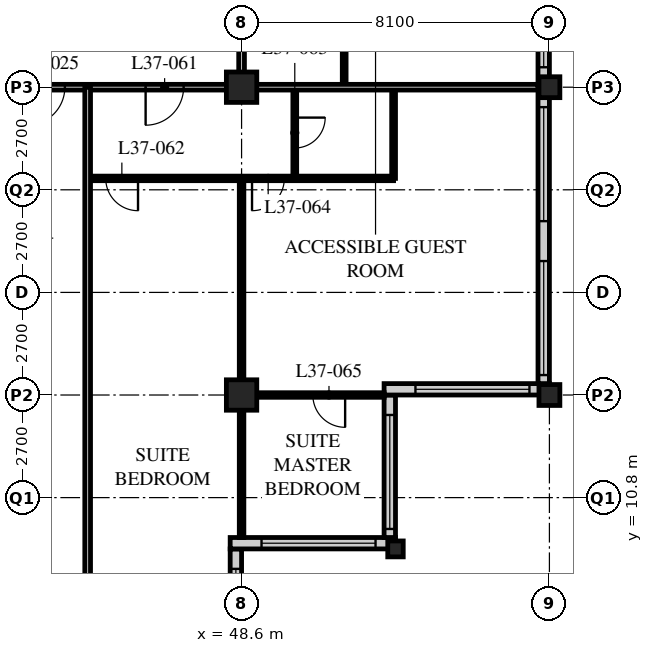
"""IFC4 building model, lengths in metres.
Left out: names, types, materials, properties, quantities, classifications, styles, units other than length and angle.
Written with IfcOpenShell. Run it as: python <this file> out.ifc"""

import sys

from ifc_helpers import new_model, si_unit, direction, frame, frame_2d, origin, origin_2d, place, context, subcontext, project, spatial, rectangle, hollow_rectangle, i_section, extrude, element, fill, save


model = new_model("IFC4")
c1 = context("Model", 3, precision=1e-05, world=origin(), true_north=direction((0.0, 1.0)))
c2 = subcontext(c1, "Body", "Model", "MODEL_VIEW")
j1 = project(units=[si_unit("LENGTHUNIT", "METRE"), si_unit("PLANEANGLEUNIT", "RADIAN")], contexts=[c1])
p1 = place(None, origin())
s1 = spatial("IfcSite", under=j1, at=p1, CompositionType="ELEMENT")
p2 = place(p1, origin())
s2 = spatial("IfcBuilding", under=s1, at=p2, CompositionType="ELEMENT")
p3 = place(p2, frame((0.0, 0.0, 144.2)))
s3 = spatial("IfcBuildingStorey", under=s2, at=p3, CompositionType="ELEMENT", Elevation=144.2)
for number, where, z_axis, x_axis in (
    (1, (48.6, 13.5, 0.0), (0.0, 0.0, 1.0), (1.0, 0.0, 0.0)),
    (2, (48.6, 21.6, 0.0), (0.0, 0.0, 1.0), (1.0, 0.0, 0.0)),
):
    element("IfcColumn", number, at=place(p3, frame(where, z_axis=z_axis, x_axis=x_axis)), inside=s3, PredefinedType="COLUMN", context=c2, shape_type="SweptSolid", body=[
        extrude(hollow_rectangle(XDim=0.8, YDim=0.8, WallThickness=0.08, at=origin_2d()), origin(), (0.0, 0.0, 1.0), 3.4),
    ])
p4 = place(p3, frame((52.65, 9.45, 0.0), z_axis=(0.0, 0.0, 1.0), x_axis=(1.0, 0.0, 0.0)))
e3 = element("IfcColumn", 3, at=p4, inside=s3, PredefinedType="COLUMN", context=c2, shape_type="SweptSolid", body=[
    extrude(i_section(OverallWidth=0.407, OverallDepth=0.419, WebThickness=0.031, FlangeThickness=0.049, FilletRadius=0.015, at=origin_2d()), origin(), (0.0, 0.0, 1.0), 3.4),
])
for number, where, z_axis, x_axis in (
    (4, (56.7, 13.5, 0.0), (0.0, 0.0, 1.0), (1.0, 0.0, 0.0)),
    (5, (56.7, 21.6, 0.0), (0.0, 0.0, 1.0), (1.0, 0.0, 0.0)),
):
    element("IfcColumn", number, at=place(p3, frame(where, z_axis=z_axis, x_axis=x_axis)), inside=s3, PredefinedType="COLUMN", context=c2, shape_type="SweptSolid", body=[
        extrude(hollow_rectangle(XDim=0.55, YDim=0.55, WallThickness=0.04, at=origin_2d()), origin(), (0.0, 0.0, 1.0), 3.4),
    ])
p5 = place(p3, frame((48.45, 5.7, 0.0), z_axis=(0.0, 0.0, 1.0), x_axis=(0.0, 1.0, 0.0)))
e6 = element("IfcWall", 6, at=p5, inside=s3, PredefinedType="SOLIDWALL", context=c2, shape_type="SweptSolid", body=[
    extrude(rectangle(XDim=3.75, YDim=0.3, at=frame_2d((1.875, 0.0))), origin(), (0.0, 0.0, 1.0), 3.19),
])
p6 = place(p5, frame((0.225, 0.0, 0.9)))
e7 = element("IfcOpeningElement", 7, at=p6, cuts=e6, PredefinedType="OPENING", context=c2, shape_type="SweptSolid", body=[
    extrude(rectangle(XDim=3.0, YDim=1.4, at=frame_2d((1.5, 0.7))), frame((0.0, 0.16, 0.0), z_axis=(0.0, -1.0, 0.0), x_axis=(1.0, 0.0, 0.0)), (0.0, 0.0, 1.0), 0.32),
])
p7 = place(p3, frame((48.3, 9.6, 0.0), z_axis=(0.0, 0.0, 1.0), x_axis=(1.0, 0.0, 0.0)))
e8 = element("IfcWall", 8, at=p7, inside=s3, PredefinedType="SOLIDWALL", context=c2, shape_type="SweptSolid", body=[
    extrude(rectangle(XDim=4.35, YDim=0.3, at=frame_2d((2.175, 0.0))), origin(), (0.0, 0.0, 1.0), 3.19),
])
p8 = place(p7, frame((0.825, 0.0, 0.9)))
e9 = element("IfcOpeningElement", 9, at=p8, cuts=e8, PredefinedType="OPENING", context=c2, shape_type="SweptSolid", body=[
    extrude(rectangle(XDim=3.0, YDim=1.4, at=frame_2d((1.5, 0.7))), frame((0.0, 0.16, 0.0), z_axis=(0.0, -1.0, 0.0), x_axis=(1.0, 0.0, 0.0)), (0.0, 0.0, 1.0), 0.32),
])
p9 = place(p3, frame((52.5, 9.75, 0.0), z_axis=(0.0, 0.0, 1.0), x_axis=(0.0, 1.0, 0.0)))
e10 = element("IfcWall", 10, at=p9, inside=s3, PredefinedType="SOLIDWALL", context=c2, shape_type="SweptSolid", body=[
    extrude(rectangle(XDim=3.75, YDim=0.3, at=frame_2d((1.875, 0.0))), origin(), (0.0, 0.0, 1.0), 3.19),
])
p10 = place(p9, frame((0.225, 0.0, 0.9)))
e11 = element("IfcOpeningElement", 11, at=p10, cuts=e10, PredefinedType="OPENING", context=c2, shape_type="SweptSolid", body=[
    extrude(rectangle(XDim=3.0, YDim=1.4, at=frame_2d((1.5, 0.7))), frame((0.0, 0.16, 0.0), z_axis=(0.0, -1.0, 0.0), x_axis=(1.0, 0.0, 0.0)), (0.0, 0.0, 1.0), 0.32),
])
p11 = place(p3, frame((52.35, 13.65, 0.0), z_axis=(0.0, 0.0, 1.0), x_axis=(1.0, 0.0, 0.0)))
e12 = element("IfcWall", 12, at=p11, inside=s3, PredefinedType="SOLIDWALL", context=c2, shape_type="SweptSolid", body=[
    extrude(rectangle(XDim=4.35, YDim=0.3, at=frame_2d((2.175, 0.0))), origin(), (0.0, 0.0, 1.0), 3.19),
])
p12 = place(p11, frame((0.825, 0.0, 0.9)))
e13 = element("IfcOpeningElement", 13, at=p12, cuts=e12, PredefinedType="OPENING", context=c2, shape_type="SweptSolid", body=[
    extrude(rectangle(XDim=3.0, YDim=1.4, at=frame_2d((1.5, 0.7))), frame((0.0, 0.16, 0.0), z_axis=(0.0, -1.0, 0.0), x_axis=(1.0, 0.0, 0.0)), (0.0, 0.0, 1.0), 0.32),
])
p13 = place(p3, frame((56.55, 13.8, 0.0), z_axis=(0.0, 0.0, 1.0), x_axis=(0.0, 1.0, 0.0)))
e14 = element("IfcWall", 14, at=p13, inside=s3, PredefinedType="SOLIDWALL", context=c2, shape_type="SweptSolid", body=[
    extrude(rectangle(XDim=32.1, YDim=0.3, at=frame_2d((16.05, 0.0))), origin(), (0.0, 0.0, 1.0), 3.19),
])
p14 = place(p13, frame((0.225, 0.0, 0.9)))
e15 = element("IfcOpeningElement", 15, at=p14, cuts=e14, PredefinedType="OPENING", context=c2, shape_type="SweptSolid", body=[
    extrude(rectangle(XDim=3.0, YDim=1.4, at=frame_2d((1.5, 0.7))), frame((0.0, 0.16, 0.0), z_axis=(0.0, -1.0, 0.0), x_axis=(1.0, 0.0, 0.0)), (0.0, 0.0, 1.0), 0.32),
])
p15 = place(p13, frame((4.275, 0.0, 0.9)))
e16 = element("IfcOpeningElement", 16, at=p15, cuts=e14, PredefinedType="OPENING", context=c2, shape_type="SweptSolid", body=[
    extrude(rectangle(XDim=3.0, YDim=1.4, at=frame_2d((1.5, 0.7))), frame((0.0, 0.16, 0.0), z_axis=(0.0, -1.0, 0.0), x_axis=(1.0, 0.0, 0.0)), (0.0, 0.0, 1.0), 0.32),
])
p16 = place(p13, frame((8.325, 0.0, 0.9)))
e17 = element("IfcOpeningElement", 17, at=p16, cuts=e14, PredefinedType="OPENING", context=c2, shape_type="SweptSolid", body=[
    extrude(rectangle(XDim=3.0, YDim=1.4, at=frame_2d((1.5, 0.7))), frame((0.0, 0.16, 0.0), z_axis=(0.0, -1.0, 0.0), x_axis=(1.0, 0.0, 0.0)), (0.0, 0.0, 1.0), 0.32),
])
p17 = place(p13, frame((12.375, 0.0, 0.9)))
e18 = element("IfcOpeningElement", 18, at=p17, cuts=e14, PredefinedType="OPENING", context=c2, shape_type="SweptSolid", body=[
    extrude(rectangle(XDim=3.0, YDim=1.4, at=frame_2d((1.5, 0.7))), frame((0.0, 0.16, 0.0), z_axis=(0.0, -1.0, 0.0), x_axis=(1.0, 0.0, 0.0)), (0.0, 0.0, 1.0), 0.32),
])
p18 = place(p13, frame((16.425, 0.0, 0.9)))
e19 = element("IfcOpeningElement", 19, at=p18, cuts=e14, PredefinedType="OPENING", context=c2, shape_type="SweptSolid", body=[
    extrude(rectangle(XDim=3.0, YDim=1.4, at=frame_2d((1.5, 0.7))), frame((0.0, 0.16, 0.0), z_axis=(0.0, -1.0, 0.0), x_axis=(1.0, 0.0, 0.0)), (0.0, 0.0, 1.0), 0.32),
])
p19 = place(p13, frame((20.475, 0.0, 0.9)))
e20 = element("IfcOpeningElement", 20, at=p19, cuts=e14, PredefinedType="OPENING", context=c2, shape_type="SweptSolid", body=[
    extrude(rectangle(XDim=3.0, YDim=1.4, at=frame_2d((1.5, 0.7))), frame((0.0, 0.16, 0.0), z_axis=(0.0, -1.0, 0.0), x_axis=(1.0, 0.0, 0.0)), (0.0, 0.0, 1.0), 0.32),
])
p20 = place(p13, frame((24.525, 0.0, 0.9)))
e21 = element("IfcOpeningElement", 21, at=p20, cuts=e14, PredefinedType="OPENING", context=c2, shape_type="SweptSolid", body=[
    extrude(rectangle(XDim=3.0, YDim=1.4, at=frame_2d((1.5, 0.7))), frame((0.0, 0.16, 0.0), z_axis=(0.0, -1.0, 0.0), x_axis=(1.0, 0.0, 0.0)), (0.0, 0.0, 1.0), 0.32),
])
p21 = place(p13, frame((28.575, 0.0, 0.9)))
e22 = element("IfcOpeningElement", 22, at=p21, cuts=e14, PredefinedType="OPENING", context=c2, shape_type="SweptSolid", body=[
    extrude(rectangle(XDim=3.0, YDim=1.4, at=frame_2d((1.5, 0.7))), frame((0.0, 0.16, 0.0), z_axis=(0.0, -1.0, 0.0), x_axis=(1.0, 0.0, 0.0)), (0.0, 0.0, 1.0), 0.32),
])
p22 = place(p3, frame((12.15, 21.6, 0.0), z_axis=(0.0, 0.0, 1.0), x_axis=(1.0, 0.0, 0.0)))
e23 = element("IfcWall", 23, at=p22, inside=s3, PredefinedType="PARTITIONING", context=c2, shape_type="SweptSolid", body=[
    extrude(rectangle(XDim=36.45, YDim=0.15, at=frame_2d((18.225, 0.0))), origin(), (0.0, 0.0, 1.0), 2.42),
])
p23 = place(p22, frame((5.95, 0.0, 0.0)))
e24 = element("IfcOpeningElement", 24, at=p23, cuts=e23, PredefinedType="OPENING", context=c2, shape_type="SweptSolid", body=[
    extrude(rectangle(XDim=1.0, YDim=2.1, at=frame_2d((0.5, 1.05))), frame((0.0, 0.085, 0.0), z_axis=(0.0, -1.0, 0.0), x_axis=(1.0, 0.0, 0.0)), (0.0, 0.0, 1.0), 0.17),
])
p24 = place(p22, frame((14.05, 0.0, 0.0)))
e25 = element("IfcOpeningElement", 25, at=p24, cuts=e23, PredefinedType="OPENING", context=c2, shape_type="SweptSolid", body=[
    extrude(rectangle(XDim=1.0, YDim=2.1, at=frame_2d((0.5, 1.05))), frame((0.0, 0.085, 0.0), z_axis=(0.0, -1.0, 0.0), x_axis=(1.0, 0.0, 0.0)), (0.0, 0.0, 1.0), 0.17),
])
p25 = place(p22, frame((22.15, 0.0, 0.0)))
e26 = element("IfcOpeningElement", 26, at=p25, cuts=e23, PredefinedType="OPENING", context=c2, shape_type="SweptSolid", body=[
    extrude(rectangle(XDim=1.0, YDim=2.1, at=frame_2d((0.5, 1.05))), frame((0.0, 0.085, 0.0), z_axis=(0.0, -1.0, 0.0), x_axis=(1.0, 0.0, 0.0)), (0.0, 0.0, 1.0), 0.17),
])
p26 = place(p22, frame((30.8, 0.0, 0.0)))
e27 = element("IfcOpeningElement", 27, at=p26, cuts=e23, PredefinedType="OPENING", context=c2, shape_type="SweptSolid", body=[
    extrude(rectangle(XDim=1.0, YDim=2.1, at=frame_2d((0.5, 1.05))), frame((0.0, 0.085, 0.0), z_axis=(0.0, -1.0, 0.0), x_axis=(1.0, 0.0, 0.0)), (0.0, 0.0, 1.0), 0.17),
])
p27 = place(p22, frame((1.525, 0.0, 0.0)))
e28 = element("IfcOpeningElement", 28, at=p27, cuts=e23, PredefinedType="OPENING", context=c2, shape_type="SweptSolid", body=[
    extrude(rectangle(XDim=1.0, YDim=2.1, at=frame_2d((0.5, 1.05))), frame((0.0, 0.085, 0.0), z_axis=(0.0, -1.0, 0.0), x_axis=(1.0, 0.0, 0.0)), (0.0, 0.0, 1.0), 0.17),
])
p28 = place(p22, frame((33.925, 0.0, 0.0)))
e29 = element("IfcOpeningElement", 29, at=p28, cuts=e23, PredefinedType="OPENING", context=c2, shape_type="SweptSolid", body=[
    extrude(rectangle(XDim=1.0, YDim=2.1, at=frame_2d((0.5, 1.05))), frame((0.0, 0.085, 0.0), z_axis=(0.0, -1.0, 0.0), x_axis=(1.0, 0.0, 0.0)), (0.0, 0.0, 1.0), 0.17),
])
p29 = place(p3, frame((48.6, 21.6, 0.0), z_axis=(0.0, 0.0, 1.0), x_axis=(0.0, 1.0, 0.0)))
e30 = element("IfcWall", 30, at=p29, inside=s3, PredefinedType="PARTITIONING", context=c2, shape_type="SweptSolid", body=[
    extrude(rectangle(XDim=24.3, YDim=0.15, at=frame_2d((12.15, 0.0))), origin(), (0.0, 0.0, 1.0), 2.42),
])
p30 = place(p29, frame((2.75, 0.0, 0.0)))
e31 = element("IfcOpeningElement", 31, at=p30, cuts=e30, PredefinedType="OPENING", context=c2, shape_type="SweptSolid", body=[
    extrude(rectangle(XDim=1.0, YDim=2.1, at=frame_2d((0.5, 1.05))), frame((0.0, 0.085, 0.0), z_axis=(0.0, -1.0, 0.0), x_axis=(1.0, 0.0, 0.0)), (0.0, 0.0, 1.0), 0.17),
])
p31 = place(p29, frame((4.65, 0.0, 0.0)))
e32 = element("IfcOpeningElement", 32, at=p31, cuts=e30, PredefinedType="OPENING", context=c2, shape_type="SweptSolid", body=[
    extrude(rectangle(XDim=1.0, YDim=2.1, at=frame_2d((0.5, 1.05))), frame((0.0, 0.085, 0.0), z_axis=(0.0, -1.0, 0.0), x_axis=(1.0, 0.0, 0.0)), (0.0, 0.0, 1.0), 0.17),
])
p32 = place(p29, frame((13.675, 0.0, 0.0)))
e33 = element("IfcOpeningElement", 33, at=p32, cuts=e30, PredefinedType="OPENING", context=c2, shape_type="SweptSolid", body=[
    extrude(rectangle(XDim=1.0, YDim=2.1, at=frame_2d((0.5, 1.05))), frame((0.0, 0.085, 0.0), z_axis=(0.0, -1.0, 0.0), x_axis=(1.0, 0.0, 0.0)), (0.0, 0.0, 1.0), 0.17),
])
p33 = place(p29, frame((20.85, 0.0, 0.0)))
e34 = element("IfcOpeningElement", 34, at=p33, cuts=e30, PredefinedType="OPENING", context=c2, shape_type="SweptSolid", body=[
    extrude(rectangle(XDim=1.0, YDim=2.1, at=frame_2d((0.5, 1.05))), frame((0.0, 0.085, 0.0), z_axis=(0.0, -1.0, 0.0), x_axis=(1.0, 0.0, 0.0)), (0.0, 0.0, 1.0), 0.17),
])
p34 = place(p3, frame((51.3, 21.6, 0.0), z_axis=(0.0, 0.0, 1.0), x_axis=(0.0, 1.0, 0.0)))
e35 = element("IfcWall", 35, at=p34, inside=s3, PredefinedType="PARTITIONING", context=c2, shape_type="SweptSolid", body=[
    extrude(rectangle(XDim=2.6, YDim=0.1, at=frame_2d((1.3, 0.0))), origin(), (0.0, 0.0, 1.0), 3.19),
])
p35 = place(p3, frame((44.55, 19.2, 0.0), z_axis=(0.0, 0.0, 1.0), x_axis=(1.0, 0.0, 0.0)))
e36 = element("IfcWall", 36, at=p35, inside=s3, PredefinedType="PARTITIONING", context=c2, shape_type="SweptSolid", body=[
    extrude(rectangle(XDim=8.05, YDim=0.12, at=frame_2d((4.025, 0.0))), origin(), (0.0, 0.0, 1.0), 3.19),
])
p36 = place(p35, frame((0.475, 0.0, 0.0)))
e37 = element("IfcOpeningElement", 37, at=p36, cuts=e36, PredefinedType="OPENING", context=c2, shape_type="SweptSolid", body=[
    extrude(rectangle(XDim=0.85, YDim=2.1, at=frame_2d((0.425, 1.05))), frame((0.0, 0.07, 0.0), z_axis=(0.0, -1.0, 0.0), x_axis=(1.0, 0.0, 0.0)), (0.0, 0.0, 1.0), 0.14),
])
p37 = place(p35, frame((4.325, 0.0, 0.0)))
e38 = element("IfcOpeningElement", 38, at=p37, cuts=e36, PredefinedType="OPENING", context=c2, shape_type="SweptSolid", body=[
    extrude(rectangle(XDim=0.85, YDim=2.1, at=frame_2d((0.425, 1.05))), frame((0.0, 0.07, 0.0), z_axis=(0.0, -1.0, 0.0), x_axis=(1.0, 0.0, 0.0)), (0.0, 0.0, 1.0), 0.14),
])
p38 = place(p3, frame((50.0, 21.6, 0.0), z_axis=(0.0, 0.0, 1.0), x_axis=(0.0, -1.0, 0.0)))
e39 = element("IfcWall", 39, at=p38, inside=s3, PredefinedType="PARTITIONING", context=c2, shape_type="SweptSolid", body=[
    extrude(rectangle(XDim=2.4, YDim=0.1, at=frame_2d((1.2, 0.0))), origin(), (0.0, 0.0, 1.0), 3.19),
])
p39 = place(p38, frame((0.8, 0.0, 0.0)))
e40 = element("IfcOpeningElement", 40, at=p39, cuts=e39, PredefinedType="OPENING", context=c2, shape_type="SweptSolid", body=[
    extrude(rectangle(XDim=0.8, YDim=2.1, at=frame_2d((0.4, 1.05))), frame((0.0, 0.06, 0.0), z_axis=(0.0, -1.0, 0.0), x_axis=(1.0, 0.0, 0.0)), (0.0, 0.0, 1.0), 0.12),
])
p40 = place(p3, frame((52.6, 21.6, 0.0), z_axis=(0.0, 0.0, 1.0), x_axis=(0.0, -1.0, 0.0)))
e41 = element("IfcWall", 41, at=p40, inside=s3, PredefinedType="PARTITIONING", context=c2, shape_type="SweptSolid", body=[
    extrude(rectangle(XDim=2.4, YDim=0.1, at=frame_2d((1.2, 0.0))), origin(), (0.0, 0.0, 1.0), 3.19),
])
p41 = place(p3, frame((48.6, 19.2, 0.0), z_axis=(0.0, 0.0, 1.0), x_axis=(0.0, -1.0, 0.0)))
e42 = element("IfcWall", 42, at=p41, inside=s3, PredefinedType="PARTITIONING", context=c2, shape_type="SweptSolid", body=[
    extrude(rectangle(XDim=9.45, YDim=0.12, at=frame_2d((4.725, 0.0))), origin(), (0.0, 0.0, 1.0), 2.42),
])
p42 = place(p3, frame((48.6, 13.5, 0.0), z_axis=(0.0, 0.0, 1.0), x_axis=(1.0, 0.0, 0.0)))
e43 = element("IfcWall", 43, at=p42, inside=s3, PredefinedType="PARTITIONING", context=c2, shape_type="SweptSolid", body=[
    extrude(rectangle(XDim=3.75, YDim=0.12, at=frame_2d((1.875, 0.0))), origin(), (0.0, 0.0, 1.0), 2.42),
])
p43 = place(p42, frame((1.875, 0.0, 0.0)))
e44 = element("IfcOpeningElement", 44, at=p43, cuts=e43, PredefinedType="OPENING", context=c2, shape_type="SweptSolid", body=[
    extrude(rectangle(XDim=0.85, YDim=2.1, at=frame_2d((0.425, 1.05))), frame((0.0, 0.07, 0.0), z_axis=(0.0, -1.0, 0.0), x_axis=(1.0, 0.0, 0.0)), (0.0, 0.0, 1.0), 0.14),
])
p44 = place(p3, frame((48.6, 21.6, 0.0), z_axis=(0.0, 0.0, 1.0), x_axis=(1.0, 0.0, 0.0)))
e45 = element("IfcWall", 45, at=p44, inside=s3, PredefinedType="PARTITIONING", context=c2, shape_type="SweptSolid", body=[
    extrude(rectangle(XDim=7.8, YDim=0.15, at=frame_2d((3.9, 0.0))), origin(), (0.0, 0.0, 1.0), 2.42),
])
p45 = place(p3, frame((44.55, 21.6, 0.0), z_axis=(0.0, 0.0, 1.0), x_axis=(0.0, -1.0, 0.0)))
e46 = element("IfcWall", 46, at=p45, inside=s3, PredefinedType="PARTITIONING", context=c2, shape_type="SweptSolid", body=[
    extrude(rectangle(XDim=15.9, YDim=0.15, at=frame_2d((7.95, 0.0))), origin(), (0.0, 0.0, 1.0), 3.19),
])
p46 = place(p6, origin())
e47 = element("IfcWindow", 47, at=p46, inside=s3, PartitioningType="SINGLE_PANEL", PredefinedType="WINDOW", context=c2, shape_type="SweptSolid", body=[
    extrude(rectangle(XDim=3.0, YDim=1.4, at=frame_2d((1.5, 0.7))), frame((0.0, 0.03, 0.0), z_axis=(0.0, -1.0, 0.0), x_axis=(1.0, 0.0, 0.0)), (0.0, 0.0, 1.0), 0.06),
])
fill(e7, e47)
p47 = place(p8, origin())
e48 = element("IfcWindow", 48, at=p47, inside=s3, PartitioningType="SINGLE_PANEL", PredefinedType="WINDOW", context=c2, shape_type="SweptSolid", body=[
    extrude(rectangle(XDim=3.0, YDim=1.4, at=frame_2d((1.5, 0.7))), frame((0.0, 0.03, 0.0), z_axis=(0.0, -1.0, 0.0), x_axis=(1.0, 0.0, 0.0)), (0.0, 0.0, 1.0), 0.06),
])
fill(e9, e48)
p48 = place(p10, origin())
e49 = element("IfcWindow", 49, at=p48, inside=s3, PartitioningType="SINGLE_PANEL", PredefinedType="WINDOW", context=c2, shape_type="SweptSolid", body=[
    extrude(rectangle(XDim=3.0, YDim=1.4, at=frame_2d((1.5, 0.7))), frame((0.0, 0.03, 0.0), z_axis=(0.0, -1.0, 0.0), x_axis=(1.0, 0.0, 0.0)), (0.0, 0.0, 1.0), 0.06),
])
fill(e11, e49)
p49 = place(p12, origin())
e50 = element("IfcWindow", 50, at=p49, inside=s3, PartitioningType="SINGLE_PANEL", PredefinedType="WINDOW", context=c2, shape_type="SweptSolid", body=[
    extrude(rectangle(XDim=3.0, YDim=1.4, at=frame_2d((1.5, 0.7))), frame((0.0, 0.03, 0.0), z_axis=(0.0, -1.0, 0.0), x_axis=(1.0, 0.0, 0.0)), (0.0, 0.0, 1.0), 0.06),
])
fill(e13, e50)
p50 = place(p14, origin())
e51 = element("IfcWindow", 51, at=p50, inside=s3, PartitioningType="SINGLE_PANEL", PredefinedType="WINDOW", context=c2, shape_type="SweptSolid", body=[
    extrude(rectangle(XDim=3.0, YDim=1.4, at=frame_2d((1.5, 0.7))), frame((0.0, 0.03, 0.0), z_axis=(0.0, -1.0, 0.0), x_axis=(1.0, 0.0, 0.0)), (0.0, 0.0, 1.0), 0.06),
])
fill(e15, e51)
p51 = place(p15, origin())
e52 = element("IfcWindow", 52, at=p51, inside=s3, PartitioningType="SINGLE_PANEL", PredefinedType="WINDOW", context=c2, shape_type="SweptSolid", body=[
    extrude(rectangle(XDim=3.0, YDim=1.4, at=frame_2d((1.5, 0.7))), frame((0.0, 0.03, 0.0), z_axis=(0.0, -1.0, 0.0), x_axis=(1.0, 0.0, 0.0)), (0.0, 0.0, 1.0), 0.06),
])
fill(e16, e52)
p52 = place(p16, origin())
e53 = element("IfcWindow", 53, at=p52, inside=s3, PartitioningType="SINGLE_PANEL", PredefinedType="WINDOW", context=c2, shape_type="SweptSolid", body=[
    extrude(rectangle(XDim=3.0, YDim=1.4, at=frame_2d((1.5, 0.7))), frame((0.0, 0.03, 0.0), z_axis=(0.0, -1.0, 0.0), x_axis=(1.0, 0.0, 0.0)), (0.0, 0.0, 1.0), 0.06),
])
fill(e17, e53)
p53 = place(p26, origin())
e54 = element("IfcDoor", 54, at=p53, inside=s3, OperationType="SINGLE_SWING_RIGHT", PredefinedType="DOOR", context=c2, shape_type="SweptSolid", body=[
    extrude(rectangle(XDim=1.0, YDim=2.1, at=frame_2d((0.5, 1.05))), frame((0.0, 0.025, 0.0), z_axis=(0.0, -1.0, 0.0), x_axis=(1.0, 0.0, 0.0)), (0.0, 0.0, 1.0), 0.05),
])
fill(e27, e54)
p54 = place(p28, origin())
e55 = element("IfcDoor", 55, at=p54, inside=s3, OperationType="SINGLE_SWING_RIGHT", PredefinedType="DOOR", context=c2, shape_type="SweptSolid", body=[
    extrude(rectangle(XDim=1.0, YDim=2.1, at=frame_2d((0.5, 1.05))), frame((0.0, 0.025, 0.0), z_axis=(0.0, -1.0, 0.0), x_axis=(1.0, 0.0, 0.0)), (0.0, 0.0, 1.0), 0.05),
])
fill(e29, e55)
p55 = place(p36, origin())
e56 = element("IfcDoor", 56, at=p55, inside=s3, OperationType="SINGLE_SWING_LEFT", PredefinedType="DOOR", context=c2, shape_type="SweptSolid", body=[
    extrude(rectangle(XDim=0.85, YDim=2.1, at=frame_2d((0.425, 1.05))), frame((0.0, 0.025, 0.0), z_axis=(0.0, -1.0, 0.0), x_axis=(1.0, 0.0, 0.0)), (0.0, 0.0, 1.0), 0.05),
])
fill(e37, e56)
p56 = place(p39, origin())
e57 = element("IfcDoor", 57, at=p56, inside=s3, OperationType="SINGLE_SWING_LEFT", PredefinedType="DOOR", context=c2, shape_type="SweptSolid", body=[
    extrude(rectangle(XDim=0.8, YDim=2.1, at=frame_2d((0.4, 1.05))), frame((0.0, 0.025, 0.0), z_axis=(0.0, -1.0, 0.0), x_axis=(1.0, 0.0, 0.0)), (0.0, 0.0, 1.0), 0.05),
])
fill(e40, e57)
p57 = place(p37, origin())
e58 = element("IfcDoor", 58, at=p57, inside=s3, OperationType="SINGLE_SWING_RIGHT", PredefinedType="DOOR", context=c2, shape_type="SweptSolid", body=[
    extrude(rectangle(XDim=0.85, YDim=2.1, at=frame_2d((0.425, 1.05))), frame((0.0, 0.025, 0.0), z_axis=(0.0, -1.0, 0.0), x_axis=(1.0, 0.0, 0.0)), (0.0, 0.0, 1.0), 0.05),
])
fill(e38, e58)
p58 = place(p43, origin())
e59 = element("IfcDoor", 59, at=p58, inside=s3, OperationType="SINGLE_SWING_LEFT", PredefinedType="DOOR", context=c2, shape_type="SweptSolid", body=[
    extrude(rectangle(XDim=0.85, YDim=2.1, at=frame_2d((0.425, 1.05))), frame((0.0, 0.025, 0.0), z_axis=(0.0, -1.0, 0.0), x_axis=(1.0, 0.0, 0.0)), (0.0, 0.0, 1.0), 0.05),
])
fill(e44, e59)
save(model, sys.argv[1])
